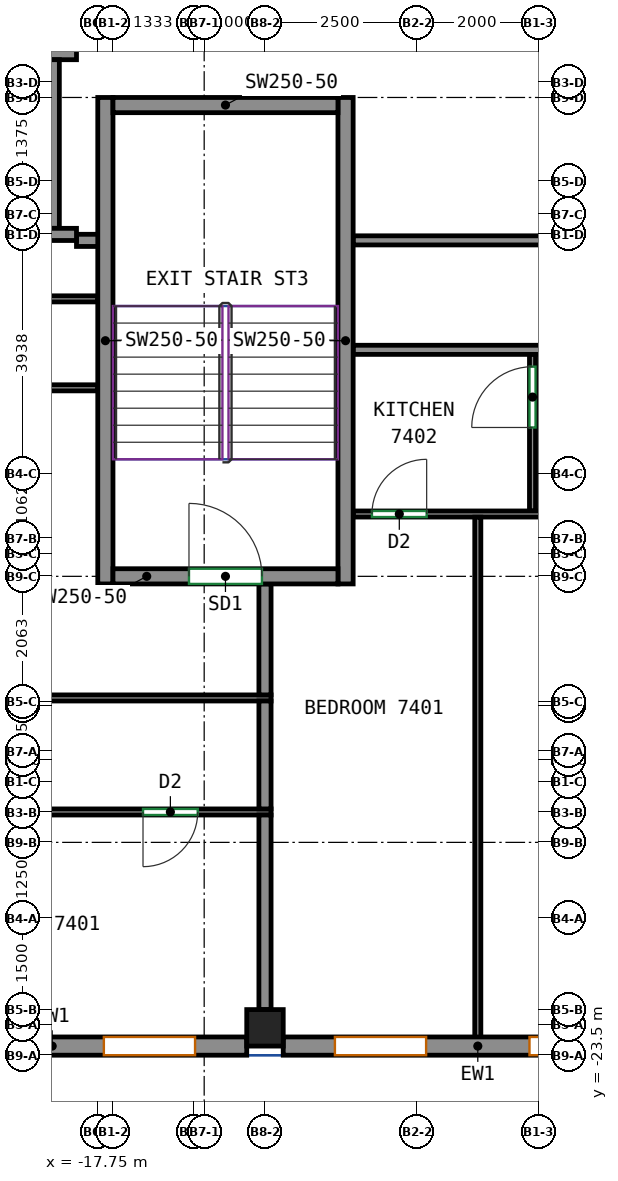
"""IFC4 building model, lengths in metres.
Left out: names, types, materials, properties, quantities, classifications, styles, units other than length and angle.
Written with IfcOpenShell. Run it as: python <this file> out.ifc"""

import sys

from ifc_helpers import new_model, si_unit, direction, frame, frame_2d, origin, origin_2d, place, context, subcontext, project, spatial, rectangle, extrude, source, transform, mapped, element, fill, save


model = new_model("IFC4")
c1 = context("Model", 3, precision=1e-05, world=origin(), true_north=direction((0.0, 1.0)))
c2 = subcontext(c1, "Body", "Model", "MODEL_VIEW")
j1 = project(units=[si_unit("LENGTHUNIT", "METRE"), si_unit("PLANEANGLEUNIT", "RADIAN")], contexts=[c1])
p1 = place(None, origin())
s1 = spatial("IfcSite", under=j1, at=p1, CompositionType="ELEMENT")
p2 = place(p1, origin())
s2 = spatial("IfcBuilding", under=s1, at=p2, CompositionType="ELEMENT")
p3 = place(p2, frame((0.0, 0.0, 298.4)))
s3 = spatial("IfcBuildingStorey", under=s2, at=p3, CompositionType="ELEMENT", Elevation=298.4)
m1 = source(origin(), c2, "Body", "SweptSolid", [
    extrude(rectangle(XDim=0.6, YDim=0.6, at=origin_2d()), origin(), (0.0, 0.0, 1.0), 3.12),
])
p4 = place(p3, frame((-15.0, -23.05, 0.0), z_axis=(0.0, 0.0, 1.0), x_axis=(1.0, 0.0, 0.0)))
e1 = element("IfcColumn", 1, at=p4, inside=s3, PredefinedType="COLUMN", context=c2, shape_type="MappedRepresentation", body=[
    mapped(m1, transform((0.0, 0.0, 0.0))),
])
m2 = source(origin(), c2, "Body", "SweptSolid", [
    extrude(rectangle(XDim=8.0, YDim=0.25, at=frame_2d((4.0, 0.0))), origin(), (0.0, 0.0, 1.0), 3.12),
])
for number, where, z_axis, x_axis in (
    (2, (-17.625, -15.75, 0.0), (0.0, 0.0, 1.0), (0.0, 1.0, 0.0)),
    (3, (-13.675, -15.75, 0.0), (0.0, 0.0, 1.0), (0.0, 1.0, 0.0)),
):
    element("IfcWall", number, at=place(p3, frame(where, z_axis=z_axis, x_axis=x_axis)), inside=s3, PredefinedType="SHEAR", context=c2, shape_type="MappedRepresentation", body=[
        mapped(m2, transform((0.0, 0.0, 0.0))),
    ])
m3 = source(origin(), c2, "Body", "SweptSolid", [
    extrude(rectangle(XDim=3.7, YDim=0.25, at=frame_2d((1.85, 0.0))), origin(), (0.0, 0.0, 1.0), 3.12),
])
p5 = place(p3, frame((-17.5, -15.625, 0.0), z_axis=(0.0, 0.0, 1.0), x_axis=(1.0, 0.0, 0.0)))
e4 = element("IfcWall", 4, at=p5, inside=s3, PredefinedType="SHEAR", context=c2, shape_type="MappedRepresentation", body=[
    mapped(m3, transform((0.0, 0.0, 0.0))),
])
p6 = place(p5, frame((1.25, 0.0, 0.0)))
e5 = element("IfcOpeningElement", 5, at=p6, cuts=e4, PredefinedType="OPENING", context=c2, shape_type="SweptSolid", body=[
    extrude(rectangle(XDim=1.2, YDim=2.1, at=frame_2d((0.6, 1.05))), frame((0.0, 0.135, 0.0), z_axis=(0.0, -1.0, 0.0), x_axis=(1.0, 0.0, 0.0)), (0.0, 0.0, 1.0), 0.27),
])
p7 = place(p3, frame((-17.5, -7.875, 0.0), z_axis=(0.0, 0.0, 1.0), x_axis=(1.0, 0.0, 0.0)))
e6 = element("IfcWall", 6, at=p7, inside=s3, PredefinedType="SHEAR", context=c2, shape_type="MappedRepresentation", body=[
    mapped(m3, transform((0.0, 0.0, 0.0))),
])
m4 = source(origin(), c2, "Body", "SweptSolid", [
    extrude(rectangle(XDim=6.4, YDim=0.3, at=frame_2d((3.2, 0.0))), origin(), (0.0, 0.0, 1.0), 3.12),
])
p8 = place(p3, frame((-21.7, -23.35, 0.0), z_axis=(0.0, 0.0, 1.0), x_axis=(1.0, 0.0, 0.0)))
e7 = element("IfcWall", 7, at=p8, inside=s3, PredefinedType="SOLIDWALL", context=c2, shape_type="MappedRepresentation", body=[
    mapped(m4, transform((0.0, 0.0, 0.0))),
])
p9 = place(p8, frame((0.85, 0.0, 0.8)))
e8 = element("IfcOpeningElement", 8, at=p9, cuts=e7, PredefinedType="OPENING", context=c2, shape_type="SweptSolid", body=[
    extrude(rectangle(XDim=1.5, YDim=2.05, at=frame_2d((0.75, 1.025))), frame((0.0, 0.16, 0.0), z_axis=(0.0, -1.0, 0.0), x_axis=(1.0, 0.0, 0.0)), (0.0, 0.0, 1.0), 0.32),
])
p10 = place(p8, frame((4.05, 0.0, 0.8)))
e9 = element("IfcOpeningElement", 9, at=p10, cuts=e7, PredefinedType="OPENING", context=c2, shape_type="SweptSolid", body=[
    extrude(rectangle(XDim=1.5, YDim=2.05, at=frame_2d((0.75, 1.025))), frame((0.0, 0.16, 0.0), z_axis=(0.0, -1.0, 0.0), x_axis=(1.0, 0.0, 0.0)), (0.0, 0.0, 1.0), 0.32),
])
p11 = place(p3, frame((-14.7, -23.35, 0.0), z_axis=(0.0, 0.0, 1.0), x_axis=(1.0, 0.0, 0.0)))
e10 = element("IfcWall", 10, at=p11, inside=s3, PredefinedType="SOLIDWALL", context=c2, shape_type="MappedRepresentation", body=[
    mapped(m4, transform((0.0, 0.0, 0.0))),
])
p12 = place(p11, frame((0.85, 0.0, 0.8)))
e11 = element("IfcOpeningElement", 11, at=p12, cuts=e10, PredefinedType="OPENING", context=c2, shape_type="SweptSolid", body=[
    extrude(rectangle(XDim=1.5, YDim=2.05, at=frame_2d((0.75, 1.025))), frame((0.0, 0.16, 0.0), z_axis=(0.0, -1.0, 0.0), x_axis=(1.0, 0.0, 0.0)), (0.0, 0.0, 1.0), 0.32),
])
p13 = place(p11, frame((4.05, 0.0, 0.8)))
e12 = element("IfcOpeningElement", 12, at=p13, cuts=e10, PredefinedType="OPENING", context=c2, shape_type="SweptSolid", body=[
    extrude(rectangle(XDim=1.5, YDim=2.05, at=frame_2d((0.75, 1.025))), frame((0.0, 0.16, 0.0), z_axis=(0.0, -1.0, 0.0), x_axis=(1.0, 0.0, 0.0)), (0.0, 0.0, 1.0), 0.32),
])
p14 = place(p3, frame((-13.55, -11.9, 0.0), z_axis=(0.0, 0.0, 1.0), x_axis=(1.0, 0.0, 0.0)))
e13 = element("IfcWall", 13, at=p14, inside=s3, PredefinedType="PARTITIONING", context=c2, shape_type="SweptSolid", body=[
    extrude(rectangle(XDim=31.3, YDim=0.15, at=frame_2d((15.65, 0.0))), origin(), (0.0, 0.0, 1.0), 3.12),
])
p15 = place(p14, frame((3.747, 0.0, 0.0)))
e14 = element("IfcOpeningElement", 14, at=p15, cuts=e13, PredefinedType="OPENING", context=c2, shape_type="SweptSolid", body=[
    extrude(rectangle(XDim=1.0, YDim=2.1, at=frame_2d((0.5, 1.05))), frame((0.0, 0.085, 0.0), z_axis=(0.0, -1.0, 0.0), x_axis=(1.0, 0.0, 0.0)), (0.0, 0.0, 1.0), 0.17),
])
p16 = place(p14, frame((22.835, 0.0, 0.0)))
e15 = element("IfcOpeningElement", 15, at=p16, cuts=e13, PredefinedType="OPENING", context=c2, shape_type="SweptSolid", body=[
    extrude(rectangle(XDim=1.0, YDim=2.1, at=frame_2d((0.5, 1.05))), frame((0.0, 0.085, 0.0), z_axis=(0.0, -1.0, 0.0), x_axis=(1.0, 0.0, 0.0)), (0.0, 0.0, 1.0), 0.17),
])
p17 = place(p3, frame((-13.55, -10.1, 0.0), z_axis=(0.0, 0.0, 1.0), x_axis=(1.0, 0.0, 0.0)))
e16 = element("IfcWall", 16, at=p17, inside=s3, PredefinedType="PARTITIONING", context=c2, shape_type="SweptSolid", body=[
    extrude(rectangle(XDim=30.65, YDim=0.15, at=frame_2d((15.325, 0.0))), origin(), (0.0, 0.0, 1.0), 3.12),
])
p18 = place(p17, frame((10.25, 0.0, 0.0)))
e17 = element("IfcOpeningElement", 17, at=p18, cuts=e16, PredefinedType="OPENING", context=c2, shape_type="SweptSolid", body=[
    extrude(rectangle(XDim=0.9, YDim=2.1, at=frame_2d((0.45, 1.05))), frame((0.0, 0.085, 0.0), z_axis=(0.0, -1.0, 0.0), x_axis=(1.0, 0.0, 0.0)), (0.0, 0.0, 1.0), 0.17),
])
p19 = place(p17, frame((22.153, 0.0, 0.0)))
e18 = element("IfcOpeningElement", 18, at=p19, cuts=e16, PredefinedType="OPENING", context=c2, shape_type="SweptSolid", body=[
    extrude(rectangle(XDim=0.9, YDim=2.1, at=frame_2d((0.45, 1.05))), frame((0.0, 0.085, 0.0), z_axis=(0.0, -1.0, 0.0), x_axis=(1.0, 0.0, 0.0)), (0.0, 0.0, 1.0), 0.17),
])
p20 = place(p3, frame((-14.9, -19.5, 0.0), z_axis=(0.0, 0.0, 1.0), x_axis=(-1.0, 0.0, 0.0)))
e19 = element("IfcWall", 19, at=p20, inside=s3, PredefinedType="PARTITIONING", context=c2, shape_type="SweptSolid", body=[
    extrude(rectangle(XDim=10.35, YDim=0.1, at=frame_2d((5.175, 0.0))), origin(), (0.0, 0.0, 1.0), 3.12),
])
p21 = place(p20, frame((1.206, 0.0, 0.0)))
e20 = element("IfcOpeningElement", 20, at=p21, cuts=e19, PredefinedType="OPENING", context=c2, shape_type="SweptSolid", body=[
    extrude(rectangle(XDim=0.9, YDim=2.1, at=frame_2d((0.45, 1.05))), frame((0.0, 0.06, 0.0), z_axis=(0.0, -1.0, 0.0), x_axis=(1.0, 0.0, 0.0)), (0.0, 0.0, 1.0), 0.12),
])
p22 = place(p3, frame((-15.0, -22.75, 0.0), z_axis=(0.0, 0.0, 1.0), x_axis=(0.0, 1.0, 0.0)))
e21 = element("IfcWall", 21, at=p22, inside=s3, PredefinedType="PARTITIONING", context=c2, shape_type="SweptSolid", body=[
    extrude(rectangle(XDim=3.2, YDim=0.2, at=frame_2d((1.6, 0.0))), origin(), (0.0, 0.0, 1.0), 3.12),
])
p23 = place(p3, frame((-14.9, -17.625, 0.0), z_axis=(0.0, 0.0, 1.0), x_axis=(-1.0, 0.0, 0.0)))
e22 = element("IfcWall", 22, at=p23, inside=s3, PredefinedType="PARTITIONING", context=c2, shape_type="SweptSolid", body=[
    extrude(rectangle(XDim=10.35, YDim=0.1, at=frame_2d((5.175, 0.0))), origin(), (0.0, 0.0, 1.0), 3.12),
])
p24 = place(p23, frame((8.546, 0.0, 0.0)))
e23 = element("IfcOpeningElement", 23, at=p24, cuts=e22, PredefinedType="OPENING", context=c2, shape_type="SweptSolid", body=[
    extrude(rectangle(XDim=0.9, YDim=2.1, at=frame_2d((0.45, 1.05))), frame((0.0, 0.06, 0.0), z_axis=(0.0, -1.0, 0.0), x_axis=(1.0, 0.0, 0.0)), (0.0, 0.0, 1.0), 0.12),
])
p25 = place(p3, frame((-15.0, -19.45, 0.0), z_axis=(0.0, 0.0, 1.0), x_axis=(0.0, 1.0, 0.0)))
e24 = element("IfcWall", 24, at=p25, inside=s3, PredefinedType="PARTITIONING", context=c2, shape_type="SweptSolid", body=[
    extrude(rectangle(XDim=1.775, YDim=0.2, at=frame_2d((0.887, 0.0))), origin(), (0.0, 0.0, 1.0), 3.12),
])
p26 = place(p3, frame((-17.75, -12.525, 0.0), z_axis=(0.0, 0.0, 1.0), x_axis=(-1.0, 0.0, 0.0)))
e25 = element("IfcWall", 25, at=p26, inside=s3, PredefinedType="PARTITIONING", context=c2, shape_type="SweptSolid", body=[
    extrude(rectangle(XDim=7.5, YDim=0.1, at=frame_2d((3.75, 0.0))), origin(), (0.0, 0.0, 1.0), 3.12),
])
p27 = place(p26, frame((5.995, 0.0, 0.0)))
e26 = element("IfcOpeningElement", 26, at=p27, cuts=e25, PredefinedType="OPENING", context=c2, shape_type="SweptSolid", body=[
    extrude(rectangle(XDim=1.0, YDim=2.1, at=frame_2d((0.5, 1.05))), frame((0.0, 0.06, 0.0), z_axis=(0.0, -1.0, 0.0), x_axis=(1.0, 0.0, 0.0)), (0.0, 0.0, 1.0), 0.12),
])
p28 = place(p3, frame((-15.0, -17.575, 0.0), z_axis=(0.0, 0.0, 1.0), x_axis=(0.0, 1.0, 0.0)))
e27 = element("IfcWall", 27, at=p28, inside=s3, PredefinedType="PARTITIONING", context=c2, shape_type="SweptSolid", body=[
    extrude(rectangle(XDim=1.825, YDim=0.2, at=frame_2d((0.913, 0.0))), origin(), (0.0, 0.0, 1.0), 3.12),
])
p29 = place(p3, frame((-17.75, -11.062, 0.0), z_axis=(0.0, 0.0, 1.0), x_axis=(-1.0, 0.0, 0.0)))
e28 = element("IfcWall", 28, at=p29, inside=s3, PredefinedType="PARTITIONING", context=c2, shape_type="SweptSolid", body=[
    extrude(rectangle(XDim=7.5, YDim=0.1, at=frame_2d((3.75, 0.0))), origin(), (0.0, 0.0, 1.0), 3.12),
])
p30 = place(p29, frame((1.115, 0.0, 0.0)))
e29 = element("IfcOpeningElement", 29, at=p30, cuts=e28, PredefinedType="OPENING", context=c2, shape_type="SweptSolid", body=[
    extrude(rectangle(XDim=0.9, YDim=2.1, at=frame_2d((0.45, 1.05))), frame((0.0, 0.06, 0.0), z_axis=(0.0, -1.0, 0.0), x_axis=(1.0, 0.0, 0.0)), (0.0, 0.0, 1.0), 0.12),
])
p31 = place(p3, frame((-17.7, -10.1, 0.0), z_axis=(0.0, 0.0, 1.0), x_axis=(-1.0, 0.0, 0.0)))
e30 = element("IfcWall", 30, at=p31, inside=s3, PredefinedType="PARTITIONING", context=c2, shape_type="SweptSolid", body=[
    extrude(rectangle(XDim=0.4, YDim=0.2, at=frame_2d((0.2, 0.0))), origin(), (0.0, 0.0, 1.0), 3.12),
])
p32 = place(p3, frame((-18.582, -7.029, 0.0), z_axis=(0.0, 0.0, 1.0), x_axis=(1.0, 0.0, 0.0)))
e31 = element("IfcWall", 31, at=p32, inside=s3, PredefinedType="PARTITIONING", context=c2, shape_type="SweptSolid", body=[
    extrude(rectangle(XDim=0.482, YDim=0.2, at=frame_2d((0.241, 0.0))), origin(), (0.0, 0.0, 1.0), 3.12),
])
p33 = place(p3, frame((-18.482, -9.902, 0.0), z_axis=(0.0, 0.0, 1.0), x_axis=(0.0, 1.0, 0.0)))
e32 = element("IfcWall", 32, at=p33, inside=s3, PredefinedType="PARTITIONING", context=c2, shape_type="SweptSolid", body=[
    extrude(rectangle(XDim=2.773, YDim=0.2, at=frame_2d((1.387, 0.0))), origin(), (0.0, 0.0, 1.0), 3.12),
])
p34 = place(p3, frame((-18.1, -10.002, 0.0), z_axis=(0.0, 0.0, 1.0), x_axis=(-1.0, 0.0, 0.0)))
e33 = element("IfcWall", 33, at=p34, inside=s3, PredefinedType="PARTITIONING", context=c2, shape_type="SweptSolid", body=[
    extrude(rectangle(XDim=0.482, YDim=0.2, at=frame_2d((0.241, 0.0))), origin(), (0.0, 0.0, 1.0), 3.12),
])
p35 = place(p3, frame((-10.6, -14.55, 0.0), z_axis=(0.0, 0.0, 1.0), x_axis=(0.0, 1.0, 0.0)))
e34 = element("IfcWall", 34, at=p35, inside=s3, PredefinedType="PARTITIONING", context=c2, shape_type="SweptSolid", body=[
    extrude(rectangle(XDim=2.573, YDim=0.1, at=frame_2d((1.287, 0.0))), origin(), (0.0, 0.0, 1.0), 3.12),
])
p36 = place(p35, frame((1.373, 0.0, 0.0)))
e35 = element("IfcOpeningElement", 35, at=p36, cuts=e34, PredefinedType="OPENING", context=c2, shape_type="SweptSolid", body=[
    extrude(rectangle(XDim=1.0, YDim=2.1, at=frame_2d((0.5, 1.05))), frame((0.0, 0.06, 0.0), z_axis=(0.0, -1.0, 0.0), x_axis=(1.0, 0.0, 0.0)), (0.0, 0.0, 1.0), 0.12),
])
p37 = place(p3, frame((-13.55, -14.6, 0.0), z_axis=(0.0, 0.0, 1.0), x_axis=(1.0, 0.0, 0.0)))
e36 = element("IfcWall", 36, at=p37, inside=s3, PredefinedType="PARTITIONING", context=c2, shape_type="SweptSolid", body=[
    extrude(rectangle(XDim=31.3, YDim=0.1, at=frame_2d((15.65, 0.0))), origin(), (0.0, 0.0, 1.0), 3.12),
])
p38 = place(p37, frame((0.309, 0.0, 0.0)))
e37 = element("IfcOpeningElement", 37, at=p38, cuts=e36, PredefinedType="OPENING", context=c2, shape_type="SweptSolid", body=[
    extrude(rectangle(XDim=0.9, YDim=2.1, at=frame_2d((0.45, 1.05))), frame((0.0, 0.06, 0.0), z_axis=(0.0, -1.0, 0.0), x_axis=(1.0, 0.0, 0.0)), (0.0, 0.0, 1.0), 0.12),
])
p39 = place(p37, frame((4.103, 0.0, 0.0)))
e38 = element("IfcOpeningElement", 38, at=p39, cuts=e36, PredefinedType="OPENING", context=c2, shape_type="SweptSolid", body=[
    extrude(rectangle(XDim=1.0, YDim=2.1, at=frame_2d((0.5, 1.05))), frame((0.0, 0.06, 0.0), z_axis=(0.0, -1.0, 0.0), x_axis=(1.0, 0.0, 0.0)), (0.0, 0.0, 1.0), 0.12),
])
p40 = place(p37, frame((13.955, 0.0, 0.0)))
e39 = element("IfcOpeningElement", 39, at=p40, cuts=e36, PredefinedType="OPENING", context=c2, shape_type="SweptSolid", body=[
    extrude(rectangle(XDim=0.9, YDim=2.1, at=frame_2d((0.45, 1.05))), frame((0.0, 0.06, 0.0), z_axis=(0.0, -1.0, 0.0), x_axis=(1.0, 0.0, 0.0)), (0.0, 0.0, 1.0), 0.12),
])
p41 = place(p37, frame((17.453, 0.0, 0.0)))
e40 = element("IfcOpeningElement", 40, at=p41, cuts=e36, PredefinedType="OPENING", context=c2, shape_type="SweptSolid", body=[
    extrude(rectangle(XDim=1.0, YDim=2.1, at=frame_2d((0.5, 1.05))), frame((0.0, 0.06, 0.0), z_axis=(0.0, -1.0, 0.0), x_axis=(1.0, 0.0, 0.0)), (0.0, 0.0, 1.0), 0.12),
])
p42 = place(p37, frame((23.13, 0.0, 0.0)))
e41 = element("IfcOpeningElement", 41, at=p42, cuts=e36, PredefinedType="OPENING", context=c2, shape_type="SweptSolid", body=[
    extrude(rectangle(XDim=1.0, YDim=2.1, at=frame_2d((0.5, 1.05))), frame((0.0, 0.06, 0.0), z_axis=(0.0, -1.0, 0.0), x_axis=(1.0, 0.0, 0.0)), (0.0, 0.0, 1.0), 0.12),
])
p43 = place(p3, frame((-11.5, -23.25, 0.0), z_axis=(0.0, 0.0, 1.0), x_axis=(0.0, 1.0, 0.0)))
e42 = element("IfcWall", 42, at=p43, inside=s3, PredefinedType="PARTITIONING", context=c2, shape_type="SweptSolid", body=[
    extrude(rectangle(XDim=8.598, YDim=0.1, at=frame_2d((4.299, 0.0))), origin(), (0.0, 0.0, 1.0), 3.12),
])
p44 = place(p10, origin())
e43 = element("IfcWindow", 43, at=p44, inside=s3, PartitioningType="SINGLE_PANEL", PredefinedType="WINDOW", context=c2, shape_type="SweptSolid", body=[
    extrude(rectangle(XDim=1.5, YDim=2.05, at=frame_2d((0.75, 1.025))), frame((0.0, 0.03, 0.0), z_axis=(0.0, -1.0, 0.0), x_axis=(1.0, 0.0, 0.0)), (0.0, 0.0, 1.0), 0.06),
])
fill(e9, e43)
p45 = place(p12, origin())
e44 = element("IfcWindow", 44, at=p45, inside=s3, PartitioningType="SINGLE_PANEL", PredefinedType="WINDOW", context=c2, shape_type="SweptSolid", body=[
    extrude(rectangle(XDim=1.5, YDim=2.05, at=frame_2d((0.75, 1.025))), frame((0.0, 0.03, 0.0), z_axis=(0.0, -1.0, 0.0), x_axis=(1.0, 0.0, 0.0)), (0.0, 0.0, 1.0), 0.06),
])
fill(e11, e44)
p46 = place(p13, origin())
e45 = element("IfcWindow", 45, at=p46, inside=s3, PartitioningType="SINGLE_PANEL", PredefinedType="WINDOW", context=c2, shape_type="SweptSolid", body=[
    extrude(rectangle(XDim=1.5, YDim=2.05, at=frame_2d((0.75, 1.025))), frame((0.0, 0.03, 0.0), z_axis=(0.0, -1.0, 0.0), x_axis=(1.0, 0.0, 0.0)), (0.0, 0.0, 1.0), 0.06),
])
fill(e12, e45)
p47 = place(p6, origin())
e46 = element("IfcDoor", 46, at=p47, inside=s3, OperationType="DOUBLE_DOOR_SINGLE_SWING", PredefinedType="DOOR", context=c2, shape_type="SweptSolid", body=[
    extrude(rectangle(XDim=1.2, YDim=2.1, at=frame_2d((0.6, 1.05))), frame((0.0, 0.025, 0.0), z_axis=(0.0, -1.0, 0.0), x_axis=(1.0, 0.0, 0.0)), (0.0, 0.0, 1.0), 0.05),
])
fill(e5, e46)
p48 = place(p21, origin())
e47 = element("IfcDoor", 47, at=p48, inside=s3, OperationType="SINGLE_SWING_RIGHT", PredefinedType="DOOR", context=c2, shape_type="SweptSolid", body=[
    extrude(rectangle(XDim=0.9, YDim=2.1, at=frame_2d((0.45, 1.05))), frame((0.0, 0.025, 0.0), z_axis=(0.0, -1.0, 0.0), x_axis=(1.0, 0.0, 0.0)), (0.0, 0.0, 1.0), 0.05),
])
fill(e20, e47)
p49 = place(p38, origin())
e48 = element("IfcDoor", 48, at=p49, inside=s3, OperationType="SINGLE_SWING_RIGHT", PredefinedType="DOOR", context=c2, shape_type="SweptSolid", body=[
    extrude(rectangle(XDim=0.9, YDim=2.1, at=frame_2d((0.45, 1.05))), frame((0.0, 0.025, 0.0), z_axis=(0.0, -1.0, 0.0), x_axis=(1.0, 0.0, 0.0)), (0.0, 0.0, 1.0), 0.05),
])
fill(e37, e48)
p50 = place(p36, origin())
e49 = element("IfcDoor", 49, at=p50, inside=s3, OperationType="SINGLE_SWING_LEFT", PredefinedType="DOOR", context=c2, shape_type="SweptSolid", body=[
    extrude(rectangle(XDim=1.0, YDim=2.1, at=frame_2d((0.5, 1.05))), frame((0.0, 0.025, 0.0), z_axis=(0.0, -1.0, 0.0), x_axis=(1.0, 0.0, 0.0)), (0.0, 0.0, 1.0), 0.05),
])
fill(e35, e49)
save(model, sys.argv[1])
